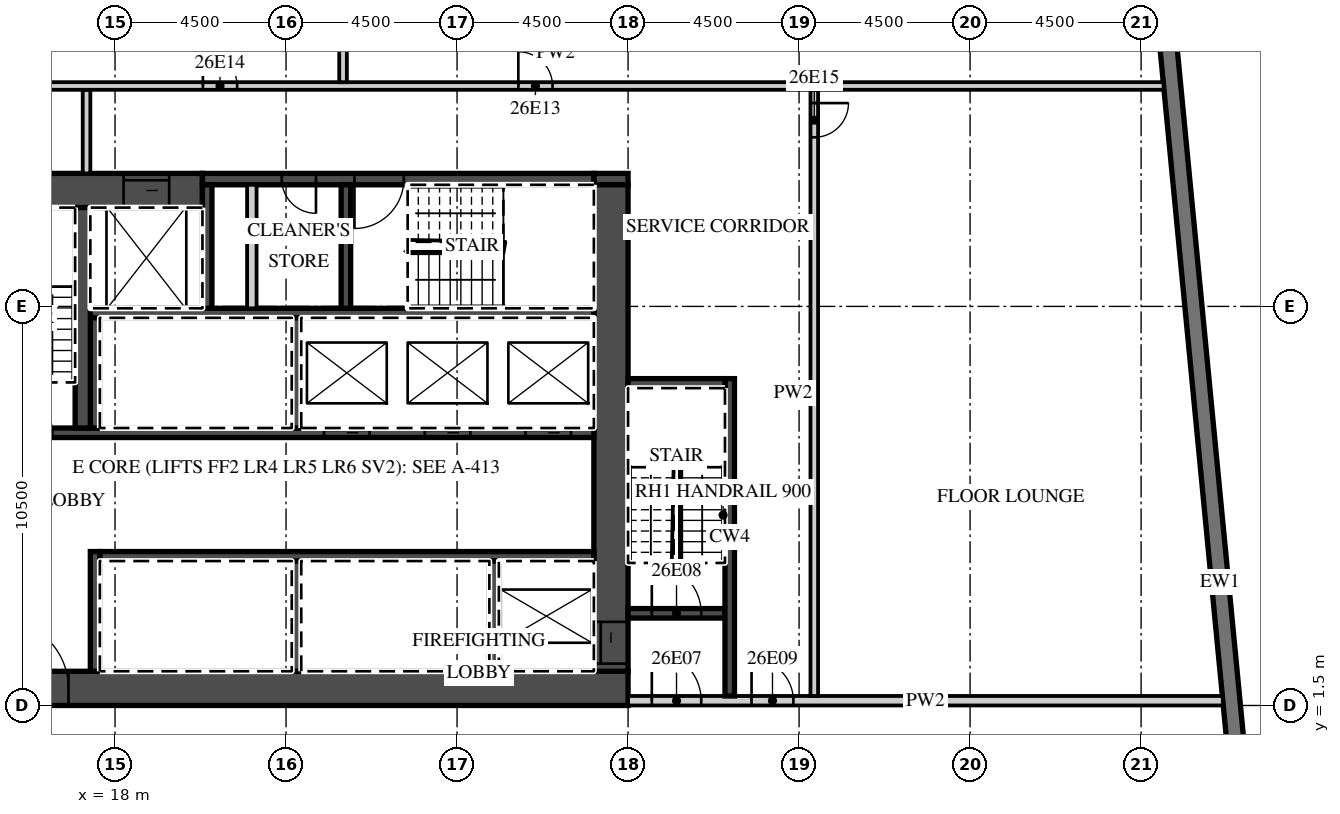
"""IFC4 building model, lengths in metres.
Left out: names, types, materials, properties, quantities, classifications, styles, units other than length and angle.
Written with IfcOpenShell. Run it as: python <this file> out.ifc"""

import sys

from ifc_helpers import new_model, si_unit, direction, frame, frame_2d, origin, place, context, subcontext, project, spatial, rectangle, extrude, element, fill, save


model = new_model("IFC4")
c1 = context("Model", 3, precision=1e-05, world=origin(), true_north=direction((0.0, 1.0)))
c2 = subcontext(c1, "Body", "Model", "MODEL_VIEW")
j1 = project(units=[si_unit("LENGTHUNIT", "METRE"), si_unit("PLANEANGLEUNIT", "RADIAN")], contexts=[c1])
p1 = place(None, origin())
s1 = spatial("IfcSite", under=j1, at=p1, CompositionType="ELEMENT")
p2 = place(p1, origin())
s2 = spatial("IfcBuilding", under=s1, at=p2, CompositionType="ELEMENT")
p3 = place(p2, frame((0.0, 0.0, 120.7)))
s3 = spatial("IfcBuildingStorey", under=s2, at=p3, CompositionType="ELEMENT", Elevation=120.7)
p4 = place(p3, frame((48.753, -12.672, 0.0), z_axis=(0.0, 0.0, 1.0), x_axis=(-0.095842661909, 0.995396495954, 0.0)))
e1 = element("IfcWall", 1, at=p4, inside=s3, PredefinedType="SOLIDWALL", context=c2, shape_type="SweptSolid", body=[
    extrude(rectangle(XDim=35.0, YDim=0.45, at=frame_2d((17.5, 0.0))), origin(), (0.0, 0.0, 1.0), 3.02),
])
p5 = place(p4, frame((3.072, 0.0, 0.45)))
e2 = element("IfcOpeningElement", 2, at=p5, cuts=e1, PredefinedType="OPENING", context=c2, shape_type="SweptSolid", body=[
    extrude(rectangle(XDim=3.3, YDim=2.25, at=frame_2d((1.65, 1.125))), frame((0.0, 0.235, 0.0), z_axis=(0.0, -1.0, 0.0), x_axis=(1.0, 0.0, 0.0)), (0.0, 0.0, 1.0), 0.47),
])
p6 = place(p4, frame((7.593, 0.0, 0.45)))
e3 = element("IfcOpeningElement", 3, at=p6, cuts=e1, PredefinedType="OPENING", context=c2, shape_type="SweptSolid", body=[
    extrude(rectangle(XDim=3.3, YDim=2.25, at=frame_2d((1.65, 1.125))), frame((0.0, 0.235, 0.0), z_axis=(0.0, -1.0, 0.0), x_axis=(1.0, 0.0, 0.0)), (0.0, 0.0, 1.0), 0.47),
])
p7 = place(p3, frame((13.5, 1.95, 0.0), z_axis=(0.0, 0.0, 1.0), x_axis=(1.0, 0.0, 0.0)))
e4 = element("IfcWall", 4, at=p7, inside=s3, PredefinedType="SHEAR", context=c2, shape_type="SweptSolid", body=[
    extrude(rectangle(XDim=18.0, YDim=0.9, at=frame_2d((9.0, 0.0))), origin(), (0.0, 0.0, 1.0), 3.02),
])
p8 = place(p7, frame((1.475, 0.0, 0.0)))
e5 = element("IfcOpeningElement", 5, at=p8, cuts=e4, PredefinedType="OPENING", context=c2, shape_type="SweptSolid", body=[
    extrude(rectangle(XDim=1.8, YDim=2.1, at=frame_2d((0.9, 1.05))), frame((0.0, 0.46, 0.0), z_axis=(0.0, -1.0, 0.0), x_axis=(1.0, 0.0, 0.0)), (0.0, 0.0, 1.0), 0.92),
])
p9 = place(p3, frame((13.5, 15.05, 0.0), z_axis=(0.0, 0.0, 1.0), x_axis=(1.0, 0.0, 0.0)))
e6 = element("IfcWall", 6, at=p9, inside=s3, PredefinedType="SHEAR", context=c2, shape_type="SweptSolid", body=[
    extrude(rectangle(XDim=6.8, YDim=0.9, at=frame_2d((3.4, 0.0))), origin(), (0.0, 0.0, 1.0), 3.02),
])
p10 = place(p9, frame((4.725, 0.0, 0.0)))
e7 = element("IfcOpeningElement", 7, at=p10, cuts=e6, PredefinedType="OPENING", context=c2, shape_type="SweptSolid", body=[
    extrude(rectangle(XDim=1.2, YDim=2.1, at=frame_2d((0.6, 1.05))), frame((0.0, 0.46, 0.0), z_axis=(0.0, -1.0, 0.0), x_axis=(1.0, 0.0, 0.0)), (0.0, 0.0, 1.0), 0.92),
])
p11 = place(p3, frame((30.6, 15.35, 0.0), z_axis=(0.0, 0.0, 1.0), x_axis=(1.0, 0.0, 0.0)))
e8 = element("IfcWall", 8, at=p11, inside=s3, PredefinedType="SHEAR", context=c2, shape_type="SweptSolid", body=[
    extrude(rectangle(XDim=0.9, YDim=0.3, at=frame_2d((0.45, 0.0))), origin(), (0.0, 0.0, 1.0), 3.02),
])
p12 = place(p3, frame((20.3, 15.35, 0.0), z_axis=(0.0, 0.0, 1.0), x_axis=(1.0, 0.0, 0.0)))
e9 = element("IfcWall", 9, at=p12, inside=s3, PredefinedType="SHEAR", context=c2, shape_type="SweptSolid", body=[
    extrude(rectangle(XDim=10.3, YDim=0.3, at=frame_2d((5.15, 0.0))), origin(), (0.0, 0.0, 1.0), 3.02),
])
p13 = place(p12, frame((4.0, 0.0, 0.0)))
e10 = element("IfcOpeningElement", 10, at=p13, cuts=e9, PredefinedType="OPENING", context=c2, shape_type="SweptSolid", body=[
    extrude(rectangle(XDim=1.3, YDim=2.1, at=frame_2d((0.65, 1.05))), frame((0.0, 0.16, 0.0), z_axis=(0.0, -1.0, 0.0), x_axis=(1.0, 0.0, 0.0)), (0.0, 0.0, 1.0), 0.32),
])
p14 = place(p12, frame((2.087, 0.0, 0.0)))
e11 = element("IfcOpeningElement", 11, at=p14, cuts=e9, PredefinedType="OPENING", context=c2, shape_type="SweptSolid", body=[
    extrude(rectangle(XDim=0.9, YDim=2.1, at=frame_2d((0.45, 1.05))), frame((0.0, 0.16, 0.0), z_axis=(0.0, -1.0, 0.0), x_axis=(1.0, 0.0, 0.0)), (0.0, 0.0, 1.0), 0.32),
])
p15 = place(p3, frame((31.05, 2.4, 0.0), z_axis=(0.0, 0.0, 1.0), x_axis=(0.0, 1.0, 0.0)))
e12 = element("IfcWall", 12, at=p15, inside=s3, PredefinedType="SHEAR", context=c2, shape_type="SweptSolid", body=[
    extrude(rectangle(XDim=12.8, YDim=0.9, at=frame_2d((6.4, 0.0))), origin(), (0.0, 0.0, 1.0), 3.02),
])
p16 = place(p15, frame((0.2, 0.0, 0.0)))
e13 = element("IfcOpeningElement", 13, at=p16, cuts=e12, PredefinedType="OPENING", context=c2, shape_type="SweptSolid", body=[
    extrude(rectangle(XDim=1.1, YDim=2.1, at=frame_2d((0.55, 1.05))), frame((0.0, 0.46, 0.0), z_axis=(0.0, -1.0, 0.0), x_axis=(1.0, 0.0, 0.0)), (0.0, 0.0, 1.0), 0.92),
])
p17 = place(p3, frame((17.6, 5.425, 0.0), z_axis=(0.0, 0.0, 1.0), x_axis=(1.0, 0.0, 0.0)))
e14 = element("IfcWall", 14, at=p17, inside=s3, PredefinedType="SHEAR", context=c2, shape_type="SweptSolid", body=[
    extrude(rectangle(XDim=13.0, YDim=0.25, at=frame_2d((6.5, 0.0))), origin(), (0.0, 0.0, 1.0), 3.02),
])
p18 = place(p3, frame((17.475, 2.4, 0.0), z_axis=(0.0, 0.0, 1.0), x_axis=(0.0, 1.0, 0.0)))
e15 = element("IfcWall", 15, at=p18, inside=s3, PredefinedType="SHEAR", context=c2, shape_type="SweptSolid", body=[
    extrude(rectangle(XDim=3.15, YDim=0.25, at=frame_2d((1.575, 0.0))), origin(), (0.0, 0.0, 1.0), 3.02),
])
for number, where, z_axis, x_axis in (
    (16, (27.975, 2.4, 0.0), (0.0, 0.0, 1.0), (0.0, 1.0, 0.0)),
    (17, (22.775, 2.4, 0.0), (0.0, 0.0, 1.0), (0.0, 1.0, 0.0)),
):
    element("IfcWall", number, at=place(p3, frame(where, z_axis=z_axis, x_axis=x_axis)), inside=s3, PredefinedType="SHEAR", context=c2, shape_type="SweptSolid", body=[
        extrude(rectangle(XDim=2.9, YDim=0.25, at=frame_2d((1.45, 0.0))), origin(), (0.0, 0.0, 1.0), 3.02),
    ])
p19 = place(p3, frame((14.4, 8.675, 0.0), z_axis=(0.0, 0.0, 1.0), x_axis=(1.0, 0.0, 0.0)))
e18 = element("IfcWall", 18, at=p19, inside=s3, PredefinedType="SHEAR", context=c2, shape_type="SweptSolid", body=[
    extrude(rectangle(XDim=16.2, YDim=0.25, at=frame_2d((8.1, 0.0))), origin(), (0.0, 0.0, 1.0), 3.02),
])
p20 = place(p19, frame((14.4, 0.0, 0.0)))
e19 = element("IfcOpeningElement", 19, at=p20, cuts=e18, PredefinedType="OPENING", context=c2, shape_type="SweptSolid", body=[
    extrude(rectangle(XDim=1.2, YDim=2.1, at=frame_2d((0.6, 1.05))), frame((0.0, 0.135, 0.0), z_axis=(0.0, -1.0, 0.0), x_axis=(1.0, 0.0, 0.0)), (0.0, 0.0, 1.0), 0.27),
])
p21 = place(p19, frame((11.75, 0.0, 0.0)))
e20 = element("IfcOpeningElement", 20, at=p21, cuts=e18, PredefinedType="OPENING", context=c2, shape_type="SweptSolid", body=[
    extrude(rectangle(XDim=1.2, YDim=2.1, at=frame_2d((0.6, 1.05))), frame((0.0, 0.135, 0.0), z_axis=(0.0, -1.0, 0.0), x_axis=(1.0, 0.0, 0.0)), (0.0, 0.0, 1.0), 0.27),
])
p22 = place(p19, frame((9.1, 0.0, 0.0)))
e21 = element("IfcOpeningElement", 21, at=p22, cuts=e18, PredefinedType="OPENING", context=c2, shape_type="SweptSolid", body=[
    extrude(rectangle(XDim=1.2, YDim=2.1, at=frame_2d((0.6, 1.05))), frame((0.0, 0.135, 0.0), z_axis=(0.0, -1.0, 0.0), x_axis=(1.0, 0.0, 0.0)), (0.0, 0.0, 1.0), 0.27),
])
p23 = place(p19, frame((0.65, 0.0, 0.0)))
e22 = element("IfcOpeningElement", 22, at=p23, cuts=e18, PredefinedType="OPENING", context=c2, shape_type="SweptSolid", body=[
    extrude(rectangle(XDim=1.3, YDim=2.1, at=frame_2d((0.65, 1.05))), frame((0.0, 0.135, 0.0), z_axis=(0.0, -1.0, 0.0), x_axis=(1.0, 0.0, 0.0)), (0.0, 0.0, 1.0), 0.27),
])
p24 = place(p3, frame((17.35, 11.825, 0.0), z_axis=(0.0, 0.0, 1.0), x_axis=(1.0, 0.0, 0.0)))
e23 = element("IfcWall", 23, at=p24, inside=s3, PredefinedType="SHEAR", context=c2, shape_type="SweptSolid", body=[
    extrude(rectangle(XDim=13.25, YDim=0.25, at=frame_2d((6.625, 0.0))), origin(), (0.0, 0.0, 1.0), 3.02),
])
for number, where, z_axis, x_axis in (
    (24, (17.475, 8.8, 0.0), (0.0, 0.0, 1.0), (0.0, 1.0, 0.0)),
    (25, (22.775, 8.8, 0.0), (0.0, 0.0, 1.0), (0.0, 1.0, 0.0)),
):
    element("IfcWall", number, at=place(p3, frame(where, z_axis=z_axis, x_axis=x_axis)), inside=s3, PredefinedType="SHEAR", context=c2, shape_type="SweptSolid", body=[
        extrude(rectangle(XDim=2.9, YDim=0.25, at=frame_2d((1.45, 0.0))), origin(), (0.0, 0.0, 1.0), 3.02),
    ])
p25 = place(p3, frame((17.15, 8.8, 0.0), z_axis=(0.0, 0.0, 1.0), x_axis=(0.0, 1.0, 0.0)))
e26 = element("IfcWall", 26, at=p25, inside=s3, PredefinedType="SHEAR", context=c2, shape_type="SweptSolid", body=[
    extrude(rectangle(XDim=5.8, YDim=0.4, at=frame_2d((2.9, 0.0))), origin(), (0.0, 0.0, 1.0), 3.02),
])
for number, where, z_axis, x_axis in (
    (27, (20.425, 11.95, 0.0), (0.0, 0.0, 1.0), (0.0, 1.0, 0.0)),
    (28, (24.075, 11.95, 0.0), (0.0, 0.0, 1.0), (0.0, 1.0, 0.0)),
):
    element("IfcWall", number, at=place(p3, frame(where, z_axis=z_axis, x_axis=x_axis)), inside=s3, PredefinedType="SHEAR", context=c2, shape_type="SweptSolid", body=[
        extrude(rectangle(XDim=3.25, YDim=0.25, at=frame_2d((1.625, 0.0))), origin(), (0.0, 0.0, 1.0), 3.02),
    ])
p26 = place(p3, frame((21.6, 11.95, 0.0), z_axis=(0.0, 0.0, 1.0), x_axis=(0.0, 1.0, 0.0)))
e29 = element("IfcWall", 29, at=p26, inside=s3, PredefinedType="PARTITIONING", context=c2, shape_type="SweptSolid", body=[
    extrude(rectangle(XDim=3.25, YDim=0.25, at=frame_2d((1.625, 0.0))), origin(), (0.0, 0.0, 1.0), 3.02),
])
p27 = place(p3, frame((31.5, 1.625, 0.0), z_axis=(0.0, 0.0, 1.0), x_axis=(1.0, 0.0, 0.0)))
e30 = element("IfcWall", 30, at=p27, inside=s3, PredefinedType="PARTITIONING", context=c2, shape_type="SweptSolid", body=[
    extrude(rectangle(XDim=15.65, YDim=0.25, at=frame_2d((7.825, 0.0))), origin(), (0.0, 0.0, 1.0), 3.02),
])
p28 = place(p27, frame((0.625, 0.0, 0.0)))
e31 = element("IfcOpeningElement", 31, at=p28, cuts=e30, PredefinedType="OPENING", context=c2, shape_type="SweptSolid", body=[
    extrude(rectangle(XDim=1.3, YDim=2.1, at=frame_2d((0.65, 1.05))), frame((0.0, 0.135, 0.0), z_axis=(0.0, -1.0, 0.0), x_axis=(1.0, 0.0, 0.0)), (0.0, 0.0, 1.0), 0.27),
])
p29 = place(p27, frame((3.25, 0.0, 0.0)))
e32 = element("IfcOpeningElement", 32, at=p29, cuts=e30, PredefinedType="OPENING", context=c2, shape_type="SweptSolid", body=[
    extrude(rectangle(XDim=1.1, YDim=2.1, at=frame_2d((0.55, 1.05))), frame((0.0, 0.135, 0.0), z_axis=(0.0, -1.0, 0.0), x_axis=(1.0, 0.0, 0.0)), (0.0, 0.0, 1.0), 0.27),
])
p30 = place(p3, frame((31.5, 3.925, 0.0), z_axis=(0.0, 0.0, 1.0), x_axis=(1.0, 0.0, 0.0)))
e33 = element("IfcWall", 33, at=p30, inside=s3, PredefinedType="SHEAR", context=c2, shape_type="SweptSolid", body=[
    extrude(rectangle(XDim=2.55, YDim=0.25, at=frame_2d((1.275, 0.0))), origin(), (0.0, 0.0, 1.0), 3.02),
])
p31 = place(p30, frame((0.625, 0.0, 0.0)))
e34 = element("IfcOpeningElement", 34, at=p31, cuts=e33, PredefinedType="OPENING", context=c2, shape_type="SweptSolid", body=[
    extrude(rectangle(XDim=1.3, YDim=2.1, at=frame_2d((0.65, 1.05))), frame((0.0, 0.135, 0.0), z_axis=(0.0, -1.0, 0.0), x_axis=(1.0, 0.0, 0.0)), (0.0, 0.0, 1.0), 0.27),
])
p32 = place(p3, frame((34.175, 1.75, 0.0), z_axis=(0.0, 0.0, 1.0), x_axis=(0.0, 1.0, 0.0)))
e35 = element("IfcWall", 35, at=p32, inside=s3, PredefinedType="SHEAR", context=c2, shape_type="SweptSolid", body=[
    extrude(rectangle(XDim=8.35, YDim=0.25, at=frame_2d((4.175, 0.0))), origin(), (0.0, 0.0, 1.0), 3.02),
])
p33 = place(p3, frame((31.5, 9.975, 0.0), z_axis=(0.0, 0.0, 1.0), x_axis=(1.0, 0.0, 0.0)))
e36 = element("IfcWall", 36, at=p33, inside=s3, PredefinedType="SHEAR", context=c2, shape_type="SweptSolid", body=[
    extrude(rectangle(XDim=2.55, YDim=0.25, at=frame_2d((1.275, 0.0))), origin(), (0.0, 0.0, 1.0), 3.02),
])
p34 = place(p3, frame((17.25, 15.5, 0.0), z_axis=(0.0, 0.0, 1.0), x_axis=(0.0, 1.0, 0.0)))
e37 = element("IfcWall", 37, at=p34, inside=s3, PredefinedType="PARTITIONING", context=c2, shape_type="SweptSolid", body=[
    extrude(rectangle(XDim=2.2, YDim=0.2, at=frame_2d((1.1, 0.0))), origin(), (0.0, 0.0, 1.0), 3.02),
])
p35 = place(p3, frame((36.4, 1.75, 0.0), z_axis=(0.0, 0.0, 1.0), x_axis=(0.0, 1.0, 0.0)))
e38 = element("IfcWall", 38, at=p35, inside=s3, PredefinedType="PARTITIONING", context=c2, shape_type="SweptSolid", body=[
    extrude(rectangle(XDim=15.95, YDim=0.2, at=frame_2d((7.975, 0.0))), origin(), (0.0, 0.0, 1.0), 3.02),
])
p36 = place(p35, frame((14.7, 0.0, 0.0)))
e39 = element("IfcOpeningElement", 39, at=p36, cuts=e38, PredefinedType="OPENING", context=c2, shape_type="SweptSolid", body=[
    extrude(rectangle(XDim=0.9, YDim=2.1, at=frame_2d((0.45, 1.05))), frame((0.0, 0.11, 0.0), z_axis=(0.0, -1.0, 0.0), x_axis=(1.0, 0.0, 0.0)), (0.0, 0.0, 1.0), 0.22),
])
p37 = place(p3, frame((13.6, 17.8, 0.0), z_axis=(0.0, 0.0, 1.0), x_axis=(1.0, 0.0, 0.0)))
e40 = element("IfcWall", 40, at=p37, inside=s3, PredefinedType="PARTITIONING", context=c2, shape_type="SweptSolid", body=[
    extrude(rectangle(XDim=31.993, YDim=0.2, at=frame_2d((15.997, 0.0))), origin(), (0.0, 0.0, 1.0), 3.02),
])
p38 = place(p37, frame((15.012, 0.0, 0.0)))
e41 = element("IfcOpeningElement", 41, at=p38, cuts=e40, PredefinedType="OPENING", context=c2, shape_type="SweptSolid", body=[
    extrude(rectangle(XDim=0.9, YDim=2.1, at=frame_2d((0.45, 1.05))), frame((0.0, 0.11, 0.0), z_axis=(0.0, -1.0, 0.0), x_axis=(1.0, 0.0, 0.0)), (0.0, 0.0, 1.0), 0.22),
])
p39 = place(p37, frame((6.712, 0.0, 0.0)))
e42 = element("IfcOpeningElement", 42, at=p39, cuts=e40, PredefinedType="OPENING", context=c2, shape_type="SweptSolid", body=[
    extrude(rectangle(XDim=0.9, YDim=2.1, at=frame_2d((0.45, 1.05))), frame((0.0, 0.11, 0.0), z_axis=(0.0, -1.0, 0.0), x_axis=(1.0, 0.0, 0.0)), (0.0, 0.0, 1.0), 0.22),
])
p40 = place(p3, frame((24.0, 17.9, 0.0), z_axis=(0.0, 0.0, 1.0), x_axis=(0.0, 1.0, 0.0)))
e43 = element("IfcWall", 43, at=p40, inside=s3, PredefinedType="PARTITIONING", context=c2, shape_type="SweptSolid", body=[
    extrude(rectangle(XDim=5.774, YDim=0.2, at=frame_2d((2.887, 0.0))), origin(), (0.0, 0.0, 1.0), 3.02),
])
p41 = place(p20, origin())
e44 = element("IfcDoor", 44, at=p41, inside=s3, OperationType="SLIDING_TO_LEFT", PredefinedType="DOOR", context=c2, shape_type="SweptSolid", body=[
    extrude(rectangle(XDim=1.2, YDim=2.1, at=frame_2d((0.6, 1.05))), frame((0.0, 0.025, 0.0), z_axis=(0.0, -1.0, 0.0), x_axis=(1.0, 0.0, 0.0)), (0.0, 0.0, 1.0), 0.05),
])
fill(e19, e44)
p42 = place(p21, origin())
e45 = element("IfcDoor", 45, at=p42, inside=s3, OperationType="SLIDING_TO_RIGHT", PredefinedType="DOOR", context=c2, shape_type="SweptSolid", body=[
    extrude(rectangle(XDim=1.2, YDim=2.1, at=frame_2d((0.6, 1.05))), frame((0.0, 0.025, 0.0), z_axis=(0.0, -1.0, 0.0), x_axis=(1.0, 0.0, 0.0)), (0.0, 0.0, 1.0), 0.05),
])
fill(e20, e45)
p43 = place(p22, origin())
e46 = element("IfcDoor", 46, at=p43, inside=s3, OperationType="SLIDING_TO_RIGHT", PredefinedType="DOOR", context=c2, shape_type="SweptSolid", body=[
    extrude(rectangle(XDim=1.2, YDim=2.1, at=frame_2d((0.6, 1.05))), frame((0.0, 0.025, 0.0), z_axis=(0.0, -1.0, 0.0), x_axis=(1.0, 0.0, 0.0)), (0.0, 0.0, 1.0), 0.05),
])
fill(e21, e46)
p44 = place(p10, origin())
e47 = element("IfcDoor", 47, at=p44, inside=s3, OperationType="SLIDING_TO_LEFT", PredefinedType="DOOR", context=c2, shape_type="SweptSolid", body=[
    extrude(rectangle(XDim=1.2, YDim=2.1, at=frame_2d((0.6, 1.05))), frame((0.0, 0.025, 0.0), z_axis=(0.0, -1.0, 0.0), x_axis=(1.0, 0.0, 0.0)), (0.0, 0.0, 1.0), 0.05),
])
fill(e7, e47)
p45 = place(p16, origin())
e48 = element("IfcDoor", 48, at=p45, inside=s3, OperationType="SLIDING_TO_LEFT", PredefinedType="DOOR", context=c2, shape_type="SweptSolid", body=[
    extrude(rectangle(XDim=1.1, YDim=2.1, at=frame_2d((0.55, 1.05))), frame((0.0, 0.025, 0.0), z_axis=(0.0, -1.0, 0.0), x_axis=(1.0, 0.0, 0.0)), (0.0, 0.0, 1.0), 0.05),
])
fill(e13, e48)
p46 = place(p8, origin())
e49 = element("IfcDoor", 49, at=p46, inside=s3, OperationType="DOUBLE_DOOR_DOUBLE_SWING", PredefinedType="DOOR", context=c2, shape_type="SweptSolid", body=[
    extrude(rectangle(XDim=1.8, YDim=2.1, at=frame_2d((0.9, 1.05))), frame((0.0, 0.025, 0.0), z_axis=(0.0, -1.0, 0.0), x_axis=(1.0, 0.0, 0.0)), (0.0, 0.0, 1.0), 0.05),
])
fill(e5, e49)
p47 = place(p28, origin())
e50 = element("IfcDoor", 50, at=p47, inside=s3, OperationType="SINGLE_SWING_LEFT", PredefinedType="DOOR", context=c2, shape_type="SweptSolid", body=[
    extrude(rectangle(XDim=1.3, YDim=2.1, at=frame_2d((0.65, 1.05))), frame((0.0, 0.025, 0.0), z_axis=(0.0, -1.0, 0.0), x_axis=(1.0, 0.0, 0.0)), (0.0, 0.0, 1.0), 0.05),
])
fill(e31, e50)
p48 = place(p31, origin())
e51 = element("IfcDoor", 51, at=p48, inside=s3, OperationType="SINGLE_SWING_LEFT", PredefinedType="DOOR", context=c2, shape_type="SweptSolid", body=[
    extrude(rectangle(XDim=1.3, YDim=2.1, at=frame_2d((0.65, 1.05))), frame((0.0, 0.025, 0.0), z_axis=(0.0, -1.0, 0.0), x_axis=(1.0, 0.0, 0.0)), (0.0, 0.0, 1.0), 0.05),
])
fill(e34, e51)
p49 = place(p29, origin())
e52 = element("IfcDoor", 52, at=p49, inside=s3, OperationType="SINGLE_SWING_LEFT", PredefinedType="DOOR", context=c2, shape_type="SweptSolid", body=[
    extrude(rectangle(XDim=1.1, YDim=2.1, at=frame_2d((0.55, 1.05))), frame((0.0, 0.025, 0.0), z_axis=(0.0, -1.0, 0.0), x_axis=(1.0, 0.0, 0.0)), (0.0, 0.0, 1.0), 0.05),
])
fill(e32, e52)
p50 = place(p13, origin())
e53 = element("IfcDoor", 53, at=p50, inside=s3, OperationType="SINGLE_SWING_LEFT", PredefinedType="DOOR", context=c2, shape_type="SweptSolid", body=[
    extrude(rectangle(XDim=1.3, YDim=2.1, at=frame_2d((0.65, 1.05))), frame((0.0, 0.025, 0.0), z_axis=(0.0, -1.0, 0.0), x_axis=(1.0, 0.0, 0.0)), (0.0, 0.0, 1.0), 0.05),
])
fill(e10, e53)
p51 = place(p14, origin())
e54 = element("IfcDoor", 54, at=p51, inside=s3, OperationType="SINGLE_SWING_RIGHT", PredefinedType="DOOR", context=c2, shape_type="SweptSolid", body=[
    extrude(rectangle(XDim=0.9, YDim=2.1, at=frame_2d((0.45, 1.05))), frame((0.0, 0.025, 0.0), z_axis=(0.0, -1.0, 0.0), x_axis=(1.0, 0.0, 0.0)), (0.0, 0.0, 1.0), 0.05),
])
fill(e11, e54)
p52 = place(p38, origin())
e55 = element("IfcDoor", 55, at=p52, inside=s3, OperationType="SINGLE_SWING_LEFT", PredefinedType="DOOR", context=c2, shape_type="SweptSolid", body=[
    extrude(rectangle(XDim=0.9, YDim=2.1, at=frame_2d((0.45, 1.05))), frame((0.0, 0.025, 0.0), z_axis=(0.0, -1.0, 0.0), x_axis=(1.0, 0.0, 0.0)), (0.0, 0.0, 1.0), 0.05),
])
fill(e41, e55)
p53 = place(p39, origin())
e56 = element("IfcDoor", 56, at=p53, inside=s3, OperationType="SINGLE_SWING_LEFT", PredefinedType="DOOR", context=c2, shape_type="SweptSolid", body=[
    extrude(rectangle(XDim=0.9, YDim=2.1, at=frame_2d((0.45, 1.05))), frame((0.0, 0.025, 0.0), z_axis=(0.0, -1.0, 0.0), x_axis=(1.0, 0.0, 0.0)), (0.0, 0.0, 1.0), 0.05),
])
fill(e42, e56)
p54 = place(p36, origin())
e57 = element("IfcDoor", 57, at=p54, inside=s3, OperationType="SINGLE_SWING_RIGHT", PredefinedType="DOOR", context=c2, shape_type="SweptSolid", body=[
    extrude(rectangle(XDim=0.9, YDim=2.1, at=frame_2d((0.45, 1.05))), frame((0.0, 0.025, 0.0), z_axis=(0.0, -1.0, 0.0), x_axis=(1.0, 0.0, 0.0)), (0.0, 0.0, 1.0), 0.05),
])
fill(e39, e57)
save(model, sys.argv[1])
